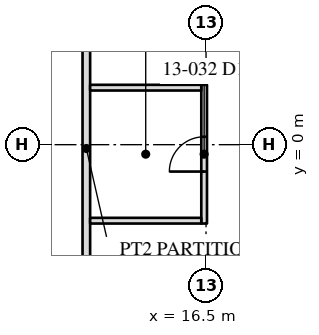
"""IFC4 building model, lengths in metres.
Left out: names, types, materials, properties, quantities, classifications, styles, units other than length and angle.
Written with IfcOpenShell. Run it as: python <this file> out.ifc"""

import sys

from ifc_helpers import new_model, si_unit, direction, frame, frame_2d, origin, place, context, subcontext, project, spatial, rectangle, extrude, element, fill, save


model = new_model("IFC4")
c1 = context("Model", 3, precision=1e-05, world=origin(), true_north=direction((0.0, 1.0)))
c2 = subcontext(c1, "Body", "Model", "MODEL_VIEW")
j1 = project(units=[si_unit("LENGTHUNIT", "METRE"), si_unit("PLANEANGLEUNIT", "RADIAN")], contexts=[c1])
p1 = place(None, origin())
s1 = spatial("IfcSite", under=j1, at=p1, CompositionType="ELEMENT")
p2 = place(p1, origin())
s2 = spatial("IfcBuilding", under=s1, at=p2, CompositionType="ELEMENT")
p3 = place(p2, frame((0.0, 0.0, 57.0)))
s3 = spatial("IfcBuildingStorey", under=s2, at=p3, CompositionType="ELEMENT", Elevation=57.0)
p4 = place(p3, frame((13.35, -13.45, 0.0), z_axis=(0.0, 0.0, 1.0), x_axis=(0.0, 1.0, 0.0)))
e1 = element("IfcWall", 1, at=p4, inside=s3, PredefinedType="PARTITIONING", context=c2, shape_type="SweptSolid", body=[
    extrude(rectangle(XDim=26.7, YDim=0.2, at=frame_2d((13.35, 0.0))), origin(), (0.0, 0.0, 1.0), 3.91),
])
p5 = place(p4, frame((5.992, 0.0, 0.0)))
e2 = element("IfcOpeningElement", 2, at=p5, cuts=e1, PredefinedType="OPENING", context=c2, shape_type="SweptSolid", body=[
    extrude(rectangle(XDim=0.915, YDim=2.134, at=frame_2d((0.458, 1.067))), frame((0.0, 0.11, 0.0), z_axis=(0.0, -1.0, 0.0), x_axis=(1.0, 0.0, 0.0)), (0.0, 0.0, 1.0), 0.22),
])
p6 = place(p3, frame((16.45, -2.075, 0.0), z_axis=(0.0, 0.0, 1.0), x_axis=(0.0, 1.0, 0.0)))
e3 = element("IfcWall", 3, at=p6, inside=s3, PredefinedType="PARTITIONING", context=c2, shape_type="SweptSolid", body=[
    extrude(rectangle(XDim=3.65, YDim=0.15, at=frame_2d((1.825, 0.0))), origin(), (0.0, 0.0, 1.0), 3.91),
])
p7 = place(p6, frame((1.367, 0.0, 0.0)))
e4 = element("IfcOpeningElement", 4, at=p7, cuts=e3, PredefinedType="OPENING", context=c2, shape_type="SweptSolid", body=[
    extrude(rectangle(XDim=0.915, YDim=2.134, at=frame_2d((0.458, 1.067))), frame((0.0, 0.085, 0.0), z_axis=(0.0, -1.0, 0.0), x_axis=(1.0, 0.0, 0.0)), (0.0, 0.0, 1.0), 0.17),
])
for number, where, z_axis, x_axis in (
    (5, (16.375, -2.0, 0.0), (0.0, 0.0, 1.0), (-1.0, 0.0, 0.0)),
    (6, (16.375, 1.5, 0.0), (0.0, 0.0, 1.0), (-1.0, 0.0, 0.0)),
):
    element("IfcWall", number, at=place(p3, frame(where, z_axis=z_axis, x_axis=x_axis)), inside=s3, PredefinedType="PARTITIONING", context=c2, shape_type="SweptSolid", body=[
        extrude(rectangle(XDim=2.925, YDim=0.15, at=frame_2d((1.462, 0.0))), origin(), (0.0, 0.0, 1.0), 3.91),
    ])
p8 = place(p7, origin())
e7 = element("IfcDoor", 7, at=p8, inside=s3, OperationType="SINGLE_SWING_LEFT", PredefinedType="DOOR", context=c2, shape_type="SweptSolid", body=[
    extrude(rectangle(XDim=0.915, YDim=2.134, at=frame_2d((0.458, 1.067))), frame((0.0, 0.025, 0.0), z_axis=(0.0, -1.0, 0.0), x_axis=(1.0, 0.0, 0.0)), (0.0, 0.0, 1.0), 0.05),
])
fill(e4, e7)
save(model, sys.argv[1])
